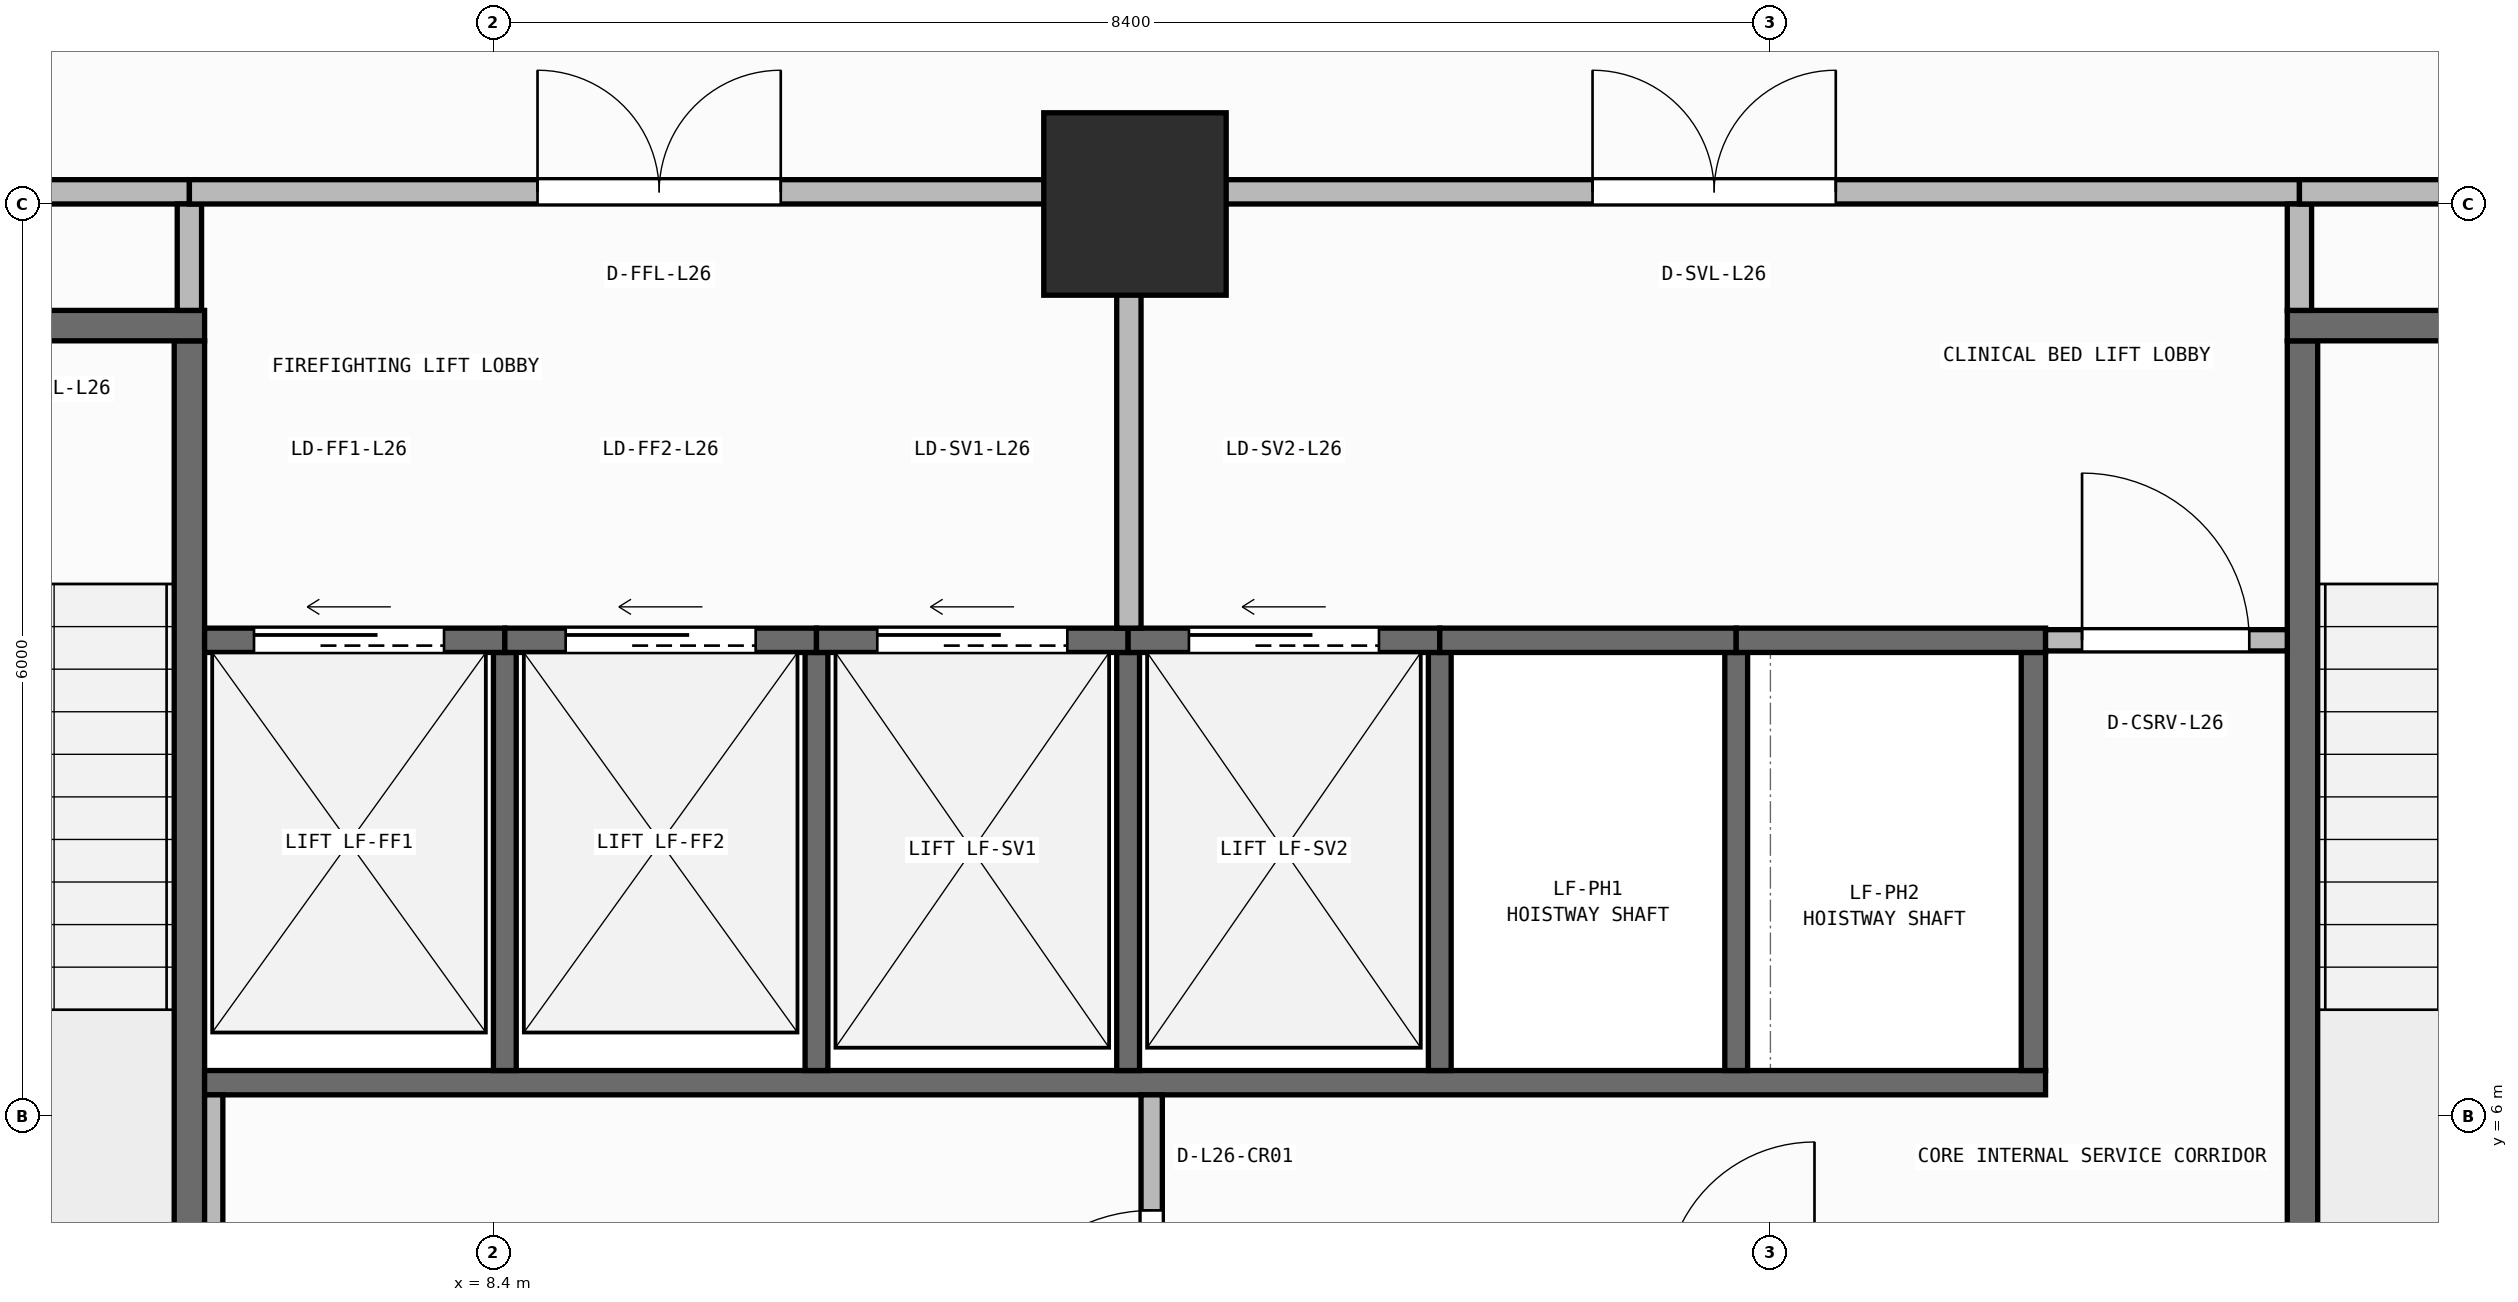
"""IFC4 building model, lengths in metres.
Left out: names, types, materials, properties, quantities, classifications, styles, units other than length and angle.
Written with IfcOpenShell. Run it as: python <this file> out.ifc"""

import sys

from ifc_helpers import new_model, si_unit, direction, frame, frame_2d, origin, origin_2d, place, context, subcontext, project, spatial, rectangle, extrude, element, fill, save


model = new_model("IFC4")
c1 = context("Model", 3, precision=1e-05, world=origin(), true_north=direction((0.0, 1.0)))
c2 = subcontext(c1, "Body", "Model", "MODEL_VIEW")
j1 = project(units=[si_unit("LENGTHUNIT", "METRE"), si_unit("PLANEANGLEUNIT", "RADIAN")], contexts=[c1])
p1 = place(None, origin())
s1 = spatial("IfcSite", under=j1, at=p1, CompositionType="ELEMENT")
p2 = place(p1, origin())
s2 = spatial("IfcBuilding", under=s1, at=p2, CompositionType="ELEMENT")
p3 = place(p2, frame((0.0, 0.0, 107.3)))
s3 = spatial("IfcBuildingStorey", under=s2, at=p3, CompositionType="ELEMENT", Elevation=107.3)
p4 = place(p3, frame((12.62, 12.0, 0.0), z_axis=(0.0, 0.0, 1.0), x_axis=(1.0, 0.0, 0.0)))
e1 = element("IfcColumn", 1, at=p4, inside=s3, PredefinedType="COLUMN", context=c2, shape_type="SweptSolid", body=[
    extrude(rectangle(XDim=1.2, YDim=1.2, at=origin_2d()), origin(), (0.0, 0.0, 1.0), 3.95),
])
p5 = place(p3, frame((6.4, 3.5, 0.0), z_axis=(0.0, 0.0, 1.0), x_axis=(0.0, 1.0, 0.0)))
e2 = element("IfcWall", 2, at=p5, inside=s3, PredefinedType="SHEAR", context=c2, shape_type="SweptSolid", body=[
    extrude(rectangle(XDim=7.6, YDim=0.2, at=frame_2d((3.8, 0.0))), origin(), (0.0, 0.0, 1.0), 3.71),
])
p6 = place(p3, frame((2.8, 11.2, 0.0), z_axis=(0.0, 0.0, 1.0), x_axis=(1.0, 0.0, 0.0)))
e3 = element("IfcWall", 3, at=p6, inside=s3, PredefinedType="SHEAR", context=c2, shape_type="SweptSolid", body=[
    extrude(rectangle(XDim=3.7, YDim=0.2, at=frame_2d((1.85, 0.0))), origin(), (0.0, 0.0, 1.0), 3.71),
])
p7 = place(p6, frame((1.2, 0.0, 0.0)))
e4 = element("IfcOpeningElement", 4, at=p7, cuts=e3, PredefinedType="OPENING", context=c2, shape_type="SweptSolid", body=[
    extrude(rectangle(XDim=1.3, YDim=2.15, at=frame_2d((0.65, 1.075))), frame((0.0, 0.11, 0.0), z_axis=(0.0, -1.0, 0.0), x_axis=(1.0, 0.0, 0.0)), (0.0, 0.0, 1.0), 0.22),
])
p8 = place(p3, frame((20.3, 3.5, 0.0), z_axis=(0.0, 0.0, 1.0), x_axis=(0.0, 1.0, 0.0)))
e5 = element("IfcWall", 5, at=p8, inside=s3, PredefinedType="SHEAR", context=c2, shape_type="SweptSolid", body=[
    extrude(rectangle(XDim=7.6, YDim=0.2, at=frame_2d((3.8, 0.0))), origin(), (0.0, 0.0, 1.0), 3.71),
])
p9 = place(p3, frame((20.2, 11.2, 0.0), z_axis=(0.0, 0.0, 1.0), x_axis=(1.0, 0.0, 0.0)))
e6 = element("IfcWall", 6, at=p9, inside=s3, PredefinedType="SHEAR", context=c2, shape_type="SweptSolid", body=[
    extrude(rectangle(XDim=3.7, YDim=0.2, at=frame_2d((1.85, 0.0))), origin(), (0.0, 0.0, 1.0), 3.71),
])
p10 = place(p9, frame((1.2, 0.0, 0.0)))
e7 = element("IfcOpeningElement", 7, at=p10, cuts=e6, PredefinedType="OPENING", context=c2, shape_type="SweptSolid", body=[
    extrude(rectangle(XDim=1.3, YDim=2.15, at=frame_2d((0.65, 1.075))), frame((0.0, 0.11, 0.0), z_axis=(0.0, -1.0, 0.0), x_axis=(1.0, 0.0, 0.0)), (0.0, 0.0, 1.0), 0.22),
])
p11 = place(p3, frame((6.5, 6.22, 0.0), z_axis=(0.0, 0.0, 1.0), x_axis=(1.0, 0.0, 0.0)))
e8 = element("IfcWall", 8, at=p11, inside=s3, PredefinedType="SHEAR", context=c2, shape_type="SweptSolid", body=[
    extrude(rectangle(XDim=12.11, YDim=0.16, at=frame_2d((6.055, 0.0))), origin(), (0.0, 0.0, 1.0), 3.71),
])
p12 = place(p3, frame((18.53, 6.3, 0.0), z_axis=(0.0, 0.0, 1.0), x_axis=(0.0, 1.0, 0.0)))
e9 = element("IfcWall", 9, at=p12, inside=s3, PredefinedType="SHEAR", context=c2, shape_type="SweptSolid", body=[
    extrude(rectangle(XDim=2.75, YDim=0.16, at=frame_2d((1.375, 0.0))), origin(), (0.0, 0.0, 1.0), 3.71),
])
for number, where, z_axis, x_axis in (
    (10, (8.475, 6.3, 0.0), (0.0, 0.0, 1.0), (0.0, 1.0, 0.0)),
    (11, (10.525, 6.3, 0.0), (0.0, 0.0, 1.0), (0.0, 1.0, 0.0)),
    (12, (12.575, 6.3, 0.0), (0.0, 0.0, 1.0), (0.0, 1.0, 0.0)),
    (13, (14.625, 6.3, 0.0), (0.0, 0.0, 1.0), (0.0, 1.0, 0.0)),
    (14, (16.575, 6.3, 0.0), (0.0, 0.0, 1.0), (0.0, 1.0, 0.0)),
):
    element("IfcWall", number, at=place(p3, frame(where, z_axis=z_axis, x_axis=x_axis)), inside=s3, PredefinedType="SHEAR", context=c2, shape_type="SweptSolid", body=[
        extrude(rectangle(XDim=2.75, YDim=0.15, at=frame_2d((1.375, 0.0))), origin(), (0.0, 0.0, 1.0), 3.71),
    ])
p13 = place(p3, frame((6.5, 9.13, 0.0), z_axis=(0.0, 0.0, 1.0), x_axis=(1.0, 0.0, 0.0)))
e15 = element("IfcWall", 15, at=p13, inside=s3, PredefinedType="SHEAR", context=c2, shape_type="SweptSolid", body=[
    extrude(rectangle(XDim=1.975, YDim=0.16, at=frame_2d((0.988, 0.0))), origin(), (0.0, 0.0, 1.0), 3.71),
])
p14 = place(p13, frame((0.325, 0.0, 0.0)))
e16 = element("IfcOpeningElement", 16, at=p14, cuts=e15, PredefinedType="OPENING", context=c2, shape_type="SweptSolid", body=[
    extrude(rectangle(XDim=1.25, YDim=2.15, at=frame_2d((0.625, 1.075))), frame((0.0, 0.09, 0.0), z_axis=(0.0, -1.0, 0.0), x_axis=(1.0, 0.0, 0.0)), (0.0, 0.0, 1.0), 0.18),
])
p15 = place(p3, frame((8.475, 9.13, 0.0), z_axis=(0.0, 0.0, 1.0), x_axis=(1.0, 0.0, 0.0)))
e17 = element("IfcWall", 17, at=p15, inside=s3, PredefinedType="SHEAR", context=c2, shape_type="SweptSolid", body=[
    extrude(rectangle(XDim=2.05, YDim=0.16, at=frame_2d((1.025, 0.0))), origin(), (0.0, 0.0, 1.0), 3.71),
])
p16 = place(p15, frame((0.4, 0.0, 0.0)))
e18 = element("IfcOpeningElement", 18, at=p16, cuts=e17, PredefinedType="OPENING", context=c2, shape_type="SweptSolid", body=[
    extrude(rectangle(XDim=1.25, YDim=2.15, at=frame_2d((0.625, 1.075))), frame((0.0, 0.09, 0.0), z_axis=(0.0, -1.0, 0.0), x_axis=(1.0, 0.0, 0.0)), (0.0, 0.0, 1.0), 0.18),
])
p17 = place(p3, frame((10.525, 9.13, 0.0), z_axis=(0.0, 0.0, 1.0), x_axis=(1.0, 0.0, 0.0)))
e19 = element("IfcWall", 19, at=p17, inside=s3, PredefinedType="SHEAR", context=c2, shape_type="SweptSolid", body=[
    extrude(rectangle(XDim=2.05, YDim=0.16, at=frame_2d((1.025, 0.0))), origin(), (0.0, 0.0, 1.0), 3.71),
])
p18 = place(p17, frame((0.4, 0.0, 0.0)))
e20 = element("IfcOpeningElement", 20, at=p18, cuts=e19, PredefinedType="OPENING", context=c2, shape_type="SweptSolid", body=[
    extrude(rectangle(XDim=1.25, YDim=2.15, at=frame_2d((0.625, 1.075))), frame((0.0, 0.09, 0.0), z_axis=(0.0, -1.0, 0.0), x_axis=(1.0, 0.0, 0.0)), (0.0, 0.0, 1.0), 0.18),
])
p19 = place(p3, frame((12.575, 9.13, 0.0), z_axis=(0.0, 0.0, 1.0), x_axis=(1.0, 0.0, 0.0)))
e21 = element("IfcWall", 21, at=p19, inside=s3, PredefinedType="SHEAR", context=c2, shape_type="SweptSolid", body=[
    extrude(rectangle(XDim=2.05, YDim=0.16, at=frame_2d((1.025, 0.0))), origin(), (0.0, 0.0, 1.0), 3.71),
])
p20 = place(p19, frame((0.4, 0.0, 0.0)))
e22 = element("IfcOpeningElement", 22, at=p20, cuts=e21, PredefinedType="OPENING", context=c2, shape_type="SweptSolid", body=[
    extrude(rectangle(XDim=1.25, YDim=2.15, at=frame_2d((0.625, 1.075))), frame((0.0, 0.09, 0.0), z_axis=(0.0, -1.0, 0.0), x_axis=(1.0, 0.0, 0.0)), (0.0, 0.0, 1.0), 0.18),
])
p21 = place(p3, frame((14.625, 9.13, 0.0), z_axis=(0.0, 0.0, 1.0), x_axis=(1.0, 0.0, 0.0)))
e23 = element("IfcWall", 23, at=p21, inside=s3, PredefinedType="SHEAR", context=c2, shape_type="SweptSolid", body=[
    extrude(rectangle(XDim=1.95, YDim=0.16, at=frame_2d((0.975, 0.0))), origin(), (0.0, 0.0, 1.0), 3.71),
])
p22 = place(p3, frame((16.575, 9.13, 0.0), z_axis=(0.0, 0.0, 1.0), x_axis=(1.0, 0.0, 0.0)))
e24 = element("IfcWall", 24, at=p22, inside=s3, PredefinedType="SHEAR", context=c2, shape_type="SweptSolid", body=[
    extrude(rectangle(XDim=2.035, YDim=0.16, at=frame_2d((1.018, 0.0))), origin(), (0.0, 0.0, 1.0), 3.71),
])
p23 = place(p3, frame((6.56, 3.52, 0.0), z_axis=(0.0, 0.0, 1.0), x_axis=(0.0, 1.0, 0.0)))
e25 = element("IfcWall", 25, at=p23, inside=s3, PredefinedType="PARTITIONING", context=c2, shape_type="SweptSolid", body=[
    extrude(rectangle(XDim=2.62, YDim=0.12, at=frame_2d((1.31, 0.0))), origin(), (0.0, 0.0, 1.0), 3.71),
])
p24 = place(p3, frame((12.73, 3.52, 0.0), z_axis=(0.0, 0.0, 1.0), x_axis=(0.0, 1.0, 0.0)))
e26 = element("IfcWall", 26, at=p24, inside=s3, PredefinedType="PARTITIONING", context=c2, shape_type="SweptSolid", body=[
    extrude(rectangle(XDim=2.62, YDim=0.14, at=frame_2d((1.31, 0.0))), origin(), (0.0, 0.0, 1.0), 3.71),
])
p25 = place(p24, frame((0.76, 0.0, 0.0)))
e27 = element("IfcOpeningElement", 27, at=p25, cuts=e26, PredefinedType="OPENING", context=c2, shape_type="SweptSolid", body=[
    extrude(rectangle(XDim=1.1, YDim=2.1, at=frame_2d((0.55, 1.05))), frame((0.0, 0.08, 0.0), z_axis=(0.0, -1.0, 0.0), x_axis=(1.0, 0.0, 0.0)), (0.0, 0.0, 1.0), 0.16),
])
p26 = place(p3, frame((18.61, 9.13, 0.0), z_axis=(0.0, 0.0, 1.0), x_axis=(1.0, 0.0, 0.0)))
e28 = element("IfcWall", 28, at=p26, inside=s3, PredefinedType="PARTITIONING", context=c2, shape_type="SweptSolid", body=[
    extrude(rectangle(XDim=1.59, YDim=0.14, at=frame_2d((0.795, 0.0))), origin(), (0.0, 0.0, 1.0), 3.71),
])
p27 = place(p26, frame((0.24, 0.0, 0.0)))
e29 = element("IfcOpeningElement", 29, at=p27, cuts=e28, PredefinedType="OPENING", context=c2, shape_type="SweptSolid", body=[
    extrude(rectangle(XDim=1.1, YDim=2.1, at=frame_2d((0.55, 1.05))), frame((0.0, 0.08, 0.0), z_axis=(0.0, -1.0, 0.0), x_axis=(1.0, 0.0, 0.0)), (0.0, 0.0, 1.0), 0.16),
])
p28 = place(p3, frame((2.8, 12.08, 0.0), z_axis=(0.0, 0.0, 1.0), x_axis=(1.0, 0.0, 0.0)))
e30 = element("IfcWall", 30, at=p28, inside=s3, PredefinedType="PARTITIONING", context=c2, shape_type="SweptSolid", body=[
    extrude(rectangle(XDim=3.6, YDim=0.16, at=frame_2d((1.8, 0.0))), origin(), (0.0, 0.0, 1.0), 3.083),
])
p29 = place(p28, frame((1.0, 0.0, 0.0)))
e31 = element("IfcOpeningElement", 31, at=p29, cuts=e30, PredefinedType="OPENING", context=c2, shape_type="SweptSolid", body=[
    extrude(rectangle(XDim=1.6, YDim=2.05, at=frame_2d((0.8, 1.025))), frame((0.0, 0.09, 0.0), z_axis=(0.0, -1.0, 0.0), x_axis=(1.0, 0.0, 0.0)), (0.0, 0.0, 1.0), 0.18),
])
p30 = place(p3, frame((6.4, 11.3, 0.0), z_axis=(0.0, 0.0, 1.0), x_axis=(0.0, 1.0, 0.0)))
e32 = element("IfcWall", 32, at=p30, inside=s3, PredefinedType="PARTITIONING", context=c2, shape_type="SweptSolid", body=[
    extrude(rectangle(XDim=0.7, YDim=0.16, at=frame_2d((0.35, 0.0))), origin(), (0.0, 0.0, 1.0), 3.71),
])
p31 = place(p3, frame((6.4, 12.08, 0.0), z_axis=(0.0, 0.0, 1.0), x_axis=(1.0, 0.0, 0.0)))
e33 = element("IfcWall", 33, at=p31, inside=s3, PredefinedType="PARTITIONING", context=c2, shape_type="SweptSolid", body=[
    extrude(rectangle(XDim=6.18, YDim=0.16, at=frame_2d((3.09, 0.0))), origin(), (0.0, 0.0, 1.0), 3.083),
])
p32 = place(p31, frame((2.29, 0.0, 0.0)))
e34 = element("IfcOpeningElement", 34, at=p32, cuts=e33, PredefinedType="OPENING", context=c2, shape_type="SweptSolid", body=[
    extrude(rectangle(XDim=1.6, YDim=2.05, at=frame_2d((0.8, 1.025))), frame((0.0, 0.09, 0.0), z_axis=(0.0, -1.0, 0.0), x_axis=(1.0, 0.0, 0.0)), (0.0, 0.0, 1.0), 0.18),
])
p33 = place(p3, frame((12.58, 9.21, 0.0), z_axis=(0.0, 0.0, 1.0), x_axis=(0.0, 1.0, 0.0)))
e35 = element("IfcWall", 35, at=p33, inside=s3, PredefinedType="PARTITIONING", context=c2, shape_type="SweptSolid", body=[
    extrude(rectangle(XDim=2.79, YDim=0.16, at=frame_2d((1.395, 0.0))), origin(), (0.0, 0.0, 1.0), 3.71),
])
p34 = place(p3, frame((12.58, 12.08, 0.0), z_axis=(0.0, 0.0, 1.0), x_axis=(1.0, 0.0, 0.0)))
e36 = element("IfcWall", 36, at=p34, inside=s3, PredefinedType="PARTITIONING", context=c2, shape_type="SweptSolid", body=[
    extrude(rectangle(XDim=7.7, YDim=0.16, at=frame_2d((3.85, 0.0))), origin(), (0.0, 0.0, 1.0), 3.083),
])
p35 = place(p34, frame((3.05, 0.0, 0.0)))
e37 = element("IfcOpeningElement", 37, at=p35, cuts=e36, PredefinedType="OPENING", context=c2, shape_type="SweptSolid", body=[
    extrude(rectangle(XDim=1.6, YDim=2.05, at=frame_2d((0.8, 1.025))), frame((0.0, 0.09, 0.0), z_axis=(0.0, -1.0, 0.0), x_axis=(1.0, 0.0, 0.0)), (0.0, 0.0, 1.0), 0.18),
])
p36 = place(p3, frame((20.28, 11.3, 0.0), z_axis=(0.0, 0.0, 1.0), x_axis=(0.0, 1.0, 0.0)))
e38 = element("IfcWall", 38, at=p36, inside=s3, PredefinedType="PARTITIONING", context=c2, shape_type="SweptSolid", body=[
    extrude(rectangle(XDim=0.7, YDim=0.16, at=frame_2d((0.35, 0.0))), origin(), (0.0, 0.0, 1.0), 3.71),
])
p37 = place(p3, frame((20.28, 12.08, 0.0), z_axis=(0.0, 0.0, 1.0), x_axis=(1.0, 0.0, 0.0)))
e39 = element("IfcWall", 39, at=p37, inside=s3, PredefinedType="PARTITIONING", context=c2, shape_type="SweptSolid", body=[
    extrude(rectangle(XDim=3.62, YDim=0.16, at=frame_2d((1.81, 0.0))), origin(), (0.0, 0.0, 1.0), 3.083),
])
p38 = place(p37, frame((1.01, 0.0, 0.0)))
e40 = element("IfcOpeningElement", 40, at=p38, cuts=e39, PredefinedType="OPENING", context=c2, shape_type="SweptSolid", body=[
    extrude(rectangle(XDim=1.6, YDim=2.05, at=frame_2d((0.8, 1.025))), frame((0.0, 0.09, 0.0), z_axis=(0.0, -1.0, 0.0), x_axis=(1.0, 0.0, 0.0)), (0.0, 0.0, 1.0), 0.18),
])
p39 = place(p14, origin())
e41 = element("IfcDoor", 41, at=p39, inside=s3, OperationType="SLIDING_TO_LEFT", PredefinedType="DOOR", context=c2, shape_type="SweptSolid", body=[
    extrude(rectangle(XDim=1.25, YDim=2.15, at=frame_2d((0.625, 1.075))), frame((0.0, 0.025, 0.0), z_axis=(0.0, -1.0, 0.0), x_axis=(1.0, 0.0, 0.0)), (0.0, 0.0, 1.0), 0.05),
])
fill(e16, e41)
p40 = place(p16, origin())
e42 = element("IfcDoor", 42, at=p40, inside=s3, OperationType="SLIDING_TO_LEFT", PredefinedType="DOOR", context=c2, shape_type="SweptSolid", body=[
    extrude(rectangle(XDim=1.25, YDim=2.15, at=frame_2d((0.625, 1.075))), frame((0.0, 0.025, 0.0), z_axis=(0.0, -1.0, 0.0), x_axis=(1.0, 0.0, 0.0)), (0.0, 0.0, 1.0), 0.05),
])
fill(e18, e42)
p41 = place(p18, origin())
e43 = element("IfcDoor", 43, at=p41, inside=s3, OperationType="SLIDING_TO_LEFT", PredefinedType="DOOR", context=c2, shape_type="SweptSolid", body=[
    extrude(rectangle(XDim=1.25, YDim=2.15, at=frame_2d((0.625, 1.075))), frame((0.0, 0.025, 0.0), z_axis=(0.0, -1.0, 0.0), x_axis=(1.0, 0.0, 0.0)), (0.0, 0.0, 1.0), 0.05),
])
fill(e20, e43)
p42 = place(p20, origin())
e44 = element("IfcDoor", 44, at=p42, inside=s3, OperationType="SLIDING_TO_LEFT", PredefinedType="DOOR", context=c2, shape_type="SweptSolid", body=[
    extrude(rectangle(XDim=1.25, YDim=2.15, at=frame_2d((0.625, 1.075))), frame((0.0, 0.025, 0.0), z_axis=(0.0, -1.0, 0.0), x_axis=(1.0, 0.0, 0.0)), (0.0, 0.0, 1.0), 0.05),
])
fill(e22, e44)
p43 = place(p25, origin())
e45 = element("IfcDoor", 45, at=p43, inside=s3, OperationType="SINGLE_SWING_LEFT", PredefinedType="DOOR", context=c2, shape_type="SweptSolid", body=[
    extrude(rectangle(XDim=1.1, YDim=2.1, at=frame_2d((0.55, 1.05))), frame((0.0, 0.025, 0.0), z_axis=(0.0, -1.0, 0.0), x_axis=(1.0, 0.0, 0.0)), (0.0, 0.0, 1.0), 0.05),
])
fill(e27, e45)
p44 = place(p27, origin())
e46 = element("IfcDoor", 46, at=p44, inside=s3, OperationType="SINGLE_SWING_LEFT", PredefinedType="DOOR", context=c2, shape_type="SweptSolid", body=[
    extrude(rectangle(XDim=1.1, YDim=2.1, at=frame_2d((0.55, 1.05))), frame((0.0, 0.025, 0.0), z_axis=(0.0, -1.0, 0.0), x_axis=(1.0, 0.0, 0.0)), (0.0, 0.0, 1.0), 0.05),
])
fill(e29, e46)
p45 = place(p32, origin())
e47 = element("IfcDoor", 47, at=p45, inside=s3, OperationType="DOUBLE_DOOR_SINGLE_SWING", PredefinedType="DOOR", context=c2, shape_type="SweptSolid", body=[
    extrude(rectangle(XDim=1.6, YDim=2.05, at=frame_2d((0.8, 1.025))), frame((0.0, 0.025, 0.0), z_axis=(0.0, -1.0, 0.0), x_axis=(1.0, 0.0, 0.0)), (0.0, 0.0, 1.0), 0.05),
])
fill(e34, e47)
p46 = place(p35, origin())
e48 = element("IfcDoor", 48, at=p46, inside=s3, OperationType="DOUBLE_DOOR_SINGLE_SWING", PredefinedType="DOOR", context=c2, shape_type="SweptSolid", body=[
    extrude(rectangle(XDim=1.6, YDim=2.05, at=frame_2d((0.8, 1.025))), frame((0.0, 0.025, 0.0), z_axis=(0.0, -1.0, 0.0), x_axis=(1.0, 0.0, 0.0)), (0.0, 0.0, 1.0), 0.05),
])
fill(e37, e48)
save(model, sys.argv[1])
